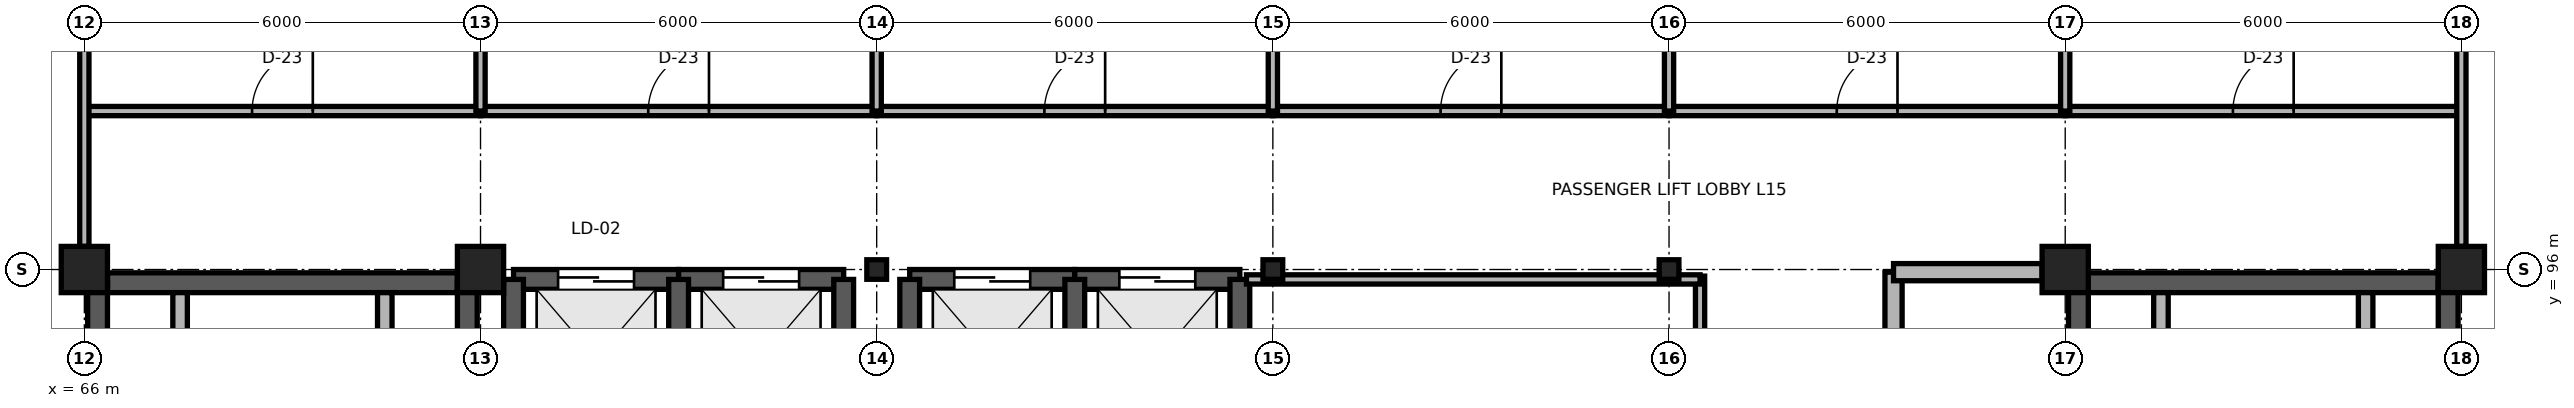
"""IFC4 building model, lengths in metres.
Left out: names, types, materials, properties, quantities, classifications, styles, units other than length and angle.
Written with IfcOpenShell. Run it as: python <this file> out.ifc"""

import sys

from ifc_helpers import new_model, si_unit, direction, frame, frame_2d, origin, origin_2d, place, context, subcontext, project, spatial, rectangle, i_section, extrude, element, fill, save


model = new_model("IFC4")
c1 = context("Model", 3, precision=1e-05, world=origin(), true_north=direction((0.0, 1.0)))
c2 = subcontext(c1, "Body", "Model", "MODEL_VIEW")
j1 = project(units=[si_unit("LENGTHUNIT", "METRE"), si_unit("PLANEANGLEUNIT", "RADIAN")], contexts=[c1])
p1 = place(None, origin())
s1 = spatial("IfcSite", under=j1, at=p1, CompositionType="ELEMENT")
p2 = place(p1, origin())
s2 = spatial("IfcBuilding", under=s1, at=p2, CompositionType="ELEMENT")
p3 = place(p2, frame((0.0, 0.0, 60.0)))
s3 = spatial("IfcBuildingStorey", under=s2, at=p3, CompositionType="ELEMENT", Elevation=60.0)
for number, where, z_axis, x_axis in (
    (1, (66.0, 96.0, 0.0), (0.0, 0.0, 1.0), (1.0, 0.0, 0.0)),
    (2, (72.0, 96.0, 0.0), (0.0, 0.0, 1.0), (1.0, 0.0, 0.0)),
):
    element("IfcColumn", number, at=place(p3, frame(where, z_axis=z_axis, x_axis=x_axis)), inside=s3, PredefinedType="COLUMN", context=c2, shape_type="SweptSolid", body=[
        extrude(rectangle(XDim=0.7, YDim=0.7, at=origin_2d()), origin(), (0.0, 0.0, 1.0), 3.9),
    ])
for number, where, z_axis, x_axis in (
    (3, (78.0, 96.0, 0.0), (0.0, 0.0, 1.0), (1.0, 0.0, 0.0)),
    (4, (84.0, 96.0, 0.0), (0.0, 0.0, 1.0), (1.0, 0.0, 0.0)),
    (5, (90.0, 96.0, 0.0), (0.0, 0.0, 1.0), (1.0, 0.0, 0.0)),
):
    element("IfcColumn", number, at=place(p3, frame(where, z_axis=z_axis, x_axis=x_axis)), inside=s3, PredefinedType="COLUMN", context=c2, shape_type="SweptSolid", body=[
        extrude(i_section(OverallWidth=0.299, OverallDepth=0.296, WebThickness=0.009, FlangeThickness=0.014, FilletRadius=0.018, at=origin_2d()), origin(), (0.0, 0.0, 1.0), 3.9),
    ])
for number, where, z_axis, x_axis in (
    (6, (96.0, 96.0, 0.0), (0.0, 0.0, 1.0), (1.0, 0.0, 0.0)),
    (7, (102.0, 96.0, 0.0), (0.0, 0.0, 1.0), (1.0, 0.0, 0.0)),
):
    element("IfcColumn", number, at=place(p3, frame(where, z_axis=z_axis, x_axis=x_axis)), inside=s3, PredefinedType="COLUMN", context=c2, shape_type="SweptSolid", body=[
        extrude(rectangle(XDim=0.7, YDim=0.7, at=origin_2d()), origin(), (0.0, 0.0, 1.0), 3.9),
    ])
p4 = place(p3, frame((66.35, 95.8, 0.0), z_axis=(0.0, 0.0, 1.0), x_axis=(1.0, 0.0, 0.0)))
e8 = element("IfcWall", 8, at=p4, inside=s3, PredefinedType="SHEAR", context=c2, shape_type="SweptSolid", body=[
    extrude(rectangle(XDim=5.3, YDim=0.3, at=frame_2d((2.65, 0.0))), origin(), (0.0, 0.0, 1.0), 3.74),
])
for number, where, z_axis, x_axis in (
    (9, (66.2, 84.0, 0.0), (0.0, 0.0, 1.0), (0.0, 1.0, 0.0)),
    (10, (71.8, 84.0, 0.0), (0.0, 0.0, 1.0), (0.0, 1.0, 0.0)),
):
    element("IfcWall", number, at=place(p3, frame(where, z_axis=z_axis, x_axis=x_axis)), inside=s3, PredefinedType="SHEAR", context=c2, shape_type="SweptSolid", body=[
        extrude(rectangle(XDim=11.8, YDim=0.3, at=frame_2d((5.9, 0.0))), origin(), (0.0, 0.0, 1.0), 3.74),
    ])
for number, where, z_axis, x_axis in (
    (11, (67.45, 94.4, 0.0), (0.0, 0.0, 1.0), (0.0, 1.0, 0.0)),
    (12, (70.55, 94.4, 0.0), (0.0, 0.0, 1.0), (0.0, 1.0, 0.0)),
):
    element("IfcWall", number, at=place(p3, frame(where, z_axis=z_axis, x_axis=x_axis)), inside=s3, PredefinedType="PARTITIONING", context=c2, shape_type="SweptSolid", body=[
        extrude(rectangle(XDim=1.25, YDim=0.22, at=frame_2d((0.625, 0.0))), origin(), (0.0, 0.0, 1.0), 3.74),
    ])
p5 = place(p3, frame((96.35, 95.8, 0.0), z_axis=(0.0, 0.0, 1.0), x_axis=(1.0, 0.0, 0.0)))
e13 = element("IfcWall", 13, at=p5, inside=s3, PredefinedType="SHEAR", context=c2, shape_type="SweptSolid", body=[
    extrude(rectangle(XDim=5.3, YDim=0.3, at=frame_2d((2.65, 0.0))), origin(), (0.0, 0.0, 1.0), 3.74),
])
for number, where, z_axis, x_axis in (
    (14, (96.2, 84.0, 0.0), (0.0, 0.0, 1.0), (0.0, 1.0, 0.0)),
    (15, (101.8, 84.0, 0.0), (0.0, 0.0, 1.0), (0.0, 1.0, 0.0)),
):
    element("IfcWall", number, at=place(p3, frame(where, z_axis=z_axis, x_axis=x_axis)), inside=s3, PredefinedType="SHEAR", context=c2, shape_type="SweptSolid", body=[
        extrude(rectangle(XDim=11.8, YDim=0.3, at=frame_2d((5.9, 0.0))), origin(), (0.0, 0.0, 1.0), 3.74),
    ])
for number, where, z_axis, x_axis in (
    (16, (97.45, 94.4, 0.0), (0.0, 0.0, 1.0), (0.0, 1.0, 0.0)),
    (17, (100.55, 94.4, 0.0), (0.0, 0.0, 1.0), (0.0, 1.0, 0.0)),
):
    element("IfcWall", number, at=place(p3, frame(where, z_axis=z_axis, x_axis=x_axis)), inside=s3, PredefinedType="PARTITIONING", context=c2, shape_type="SweptSolid", body=[
        extrude(rectangle(XDim=1.25, YDim=0.22, at=frame_2d((0.625, 0.0))), origin(), (0.0, 0.0, 1.0), 3.74),
    ])
p6 = place(p3, frame((72.5, 95.85, 0.0), z_axis=(0.0, 0.0, 1.0), x_axis=(1.0, 0.0, 0.0)))
e18 = element("IfcWall", 18, at=p6, inside=s3, PredefinedType="SHEAR", context=c2, shape_type="SweptSolid", body=[
    extrude(rectangle(XDim=2.5, YDim=0.3, at=frame_2d((1.25, 0.0))), origin(), (0.0, 0.0, 1.0), 3.74),
])
p7 = place(p6, frame((0.675, 0.0, 0.0)))
e19 = element("IfcOpeningElement", 19, at=p7, cuts=e18, PredefinedType="OPENING", context=c2, shape_type="SweptSolid", body=[
    extrude(rectangle(XDim=1.15, YDim=2.15, at=frame_2d((0.575, 1.075))), frame((0.0, 0.165, 0.0), z_axis=(0.0, -1.0, 0.0), x_axis=(1.0, 0.0, 0.0)), (0.0, 0.0, 1.0), 0.33),
])
p8 = place(p3, frame((72.5, 92.45, 0.0), z_axis=(0.0, 0.0, 1.0), x_axis=(0.0, 1.0, 0.0)))
e20 = element("IfcWall", 20, at=p8, inside=s3, PredefinedType="SHEAR", context=c2, shape_type="SweptSolid", body=[
    extrude(rectangle(XDim=3.4, YDim=0.3, at=frame_2d((1.7, 0.0))), origin(), (0.0, 0.0, 1.0), 3.74),
])
p9 = place(p3, frame((75.0, 95.85, 0.0), z_axis=(0.0, 0.0, 1.0), x_axis=(1.0, 0.0, 0.0)))
e21 = element("IfcWall", 21, at=p9, inside=s3, PredefinedType="SHEAR", context=c2, shape_type="SweptSolid", body=[
    extrude(rectangle(XDim=2.5, YDim=0.3, at=frame_2d((1.25, 0.0))), origin(), (0.0, 0.0, 1.0), 3.74),
])
p10 = place(p9, frame((0.675, 0.0, 0.0)))
e22 = element("IfcOpeningElement", 22, at=p10, cuts=e21, PredefinedType="OPENING", context=c2, shape_type="SweptSolid", body=[
    extrude(rectangle(XDim=1.15, YDim=2.15, at=frame_2d((0.575, 1.075))), frame((0.0, 0.165, 0.0), z_axis=(0.0, -1.0, 0.0), x_axis=(1.0, 0.0, 0.0)), (0.0, 0.0, 1.0), 0.33),
])
for number, where, z_axis, x_axis in (
    (23, (75.0, 92.45, 0.0), (0.0, 0.0, 1.0), (0.0, 1.0, 0.0)),
    (24, (77.5, 92.45, 0.0), (0.0, 0.0, 1.0), (0.0, 1.0, 0.0)),
):
    element("IfcWall", number, at=place(p3, frame(where, z_axis=z_axis, x_axis=x_axis)), inside=s3, PredefinedType="SHEAR", context=c2, shape_type="SweptSolid", body=[
        extrude(rectangle(XDim=3.4, YDim=0.3, at=frame_2d((1.7, 0.0))), origin(), (0.0, 0.0, 1.0), 3.74),
    ])
p11 = place(p3, frame((78.5, 95.85, 0.0), z_axis=(0.0, 0.0, 1.0), x_axis=(1.0, 0.0, 0.0)))
e25 = element("IfcWall", 25, at=p11, inside=s3, PredefinedType="SHEAR", context=c2, shape_type="SweptSolid", body=[
    extrude(rectangle(XDim=2.5, YDim=0.3, at=frame_2d((1.25, 0.0))), origin(), (0.0, 0.0, 1.0), 3.74),
])
p12 = place(p11, frame((0.675, 0.0, 0.0)))
e26 = element("IfcOpeningElement", 26, at=p12, cuts=e25, PredefinedType="OPENING", context=c2, shape_type="SweptSolid", body=[
    extrude(rectangle(XDim=1.15, YDim=2.15, at=frame_2d((0.575, 1.075))), frame((0.0, 0.165, 0.0), z_axis=(0.0, -1.0, 0.0), x_axis=(1.0, 0.0, 0.0)), (0.0, 0.0, 1.0), 0.33),
])
p13 = place(p3, frame((78.5, 92.45, 0.0), z_axis=(0.0, 0.0, 1.0), x_axis=(0.0, 1.0, 0.0)))
e27 = element("IfcWall", 27, at=p13, inside=s3, PredefinedType="SHEAR", context=c2, shape_type="SweptSolid", body=[
    extrude(rectangle(XDim=3.4, YDim=0.3, at=frame_2d((1.7, 0.0))), origin(), (0.0, 0.0, 1.0), 3.74),
])
p14 = place(p3, frame((81.0, 95.85, 0.0), z_axis=(0.0, 0.0, 1.0), x_axis=(1.0, 0.0, 0.0)))
e28 = element("IfcWall", 28, at=p14, inside=s3, PredefinedType="SHEAR", context=c2, shape_type="SweptSolid", body=[
    extrude(rectangle(XDim=2.5, YDim=0.3, at=frame_2d((1.25, 0.0))), origin(), (0.0, 0.0, 1.0), 3.74),
])
p15 = place(p14, frame((0.675, 0.0, 0.0)))
e29 = element("IfcOpeningElement", 29, at=p15, cuts=e28, PredefinedType="OPENING", context=c2, shape_type="SweptSolid", body=[
    extrude(rectangle(XDim=1.15, YDim=2.15, at=frame_2d((0.575, 1.075))), frame((0.0, 0.165, 0.0), z_axis=(0.0, -1.0, 0.0), x_axis=(1.0, 0.0, 0.0)), (0.0, 0.0, 1.0), 0.33),
])
for number, where, z_axis, x_axis in (
    (30, (81.0, 92.45, 0.0), (0.0, 0.0, 1.0), (0.0, 1.0, 0.0)),
    (31, (83.5, 92.45, 0.0), (0.0, 0.0, 1.0), (0.0, 1.0, 0.0)),
):
    element("IfcWall", number, at=place(p3, frame(where, z_axis=z_axis, x_axis=x_axis)), inside=s3, PredefinedType="SHEAR", context=c2, shape_type="SweptSolid", body=[
        extrude(rectangle(XDim=3.4, YDim=0.3, at=frame_2d((1.7, 0.0))), origin(), (0.0, 0.0, 1.0), 3.74),
    ])
p16 = place(p3, frame((93.4, 84.0, 0.0), z_axis=(0.0, 0.0, 1.0), x_axis=(0.0, 1.0, 0.0)))
e32 = element("IfcWall", 32, at=p16, inside=s3, PredefinedType="PARTITIONING", context=c2, shape_type="SweptSolid", body=[
    extrude(rectangle(XDim=11.96, YDim=0.26, at=frame_2d((5.98, 0.0))), origin(), (0.0, 0.0, 1.0), 3.74),
])
p17 = place(p16, frame((3.425, 0.0, 0.0)))
e33 = element("IfcOpeningElement", 33, at=p17, cuts=e32, PredefinedType="OPENING", context=c2, shape_type="SweptSolid", body=[
    extrude(rectangle(XDim=1.15, YDim=2.2, at=frame_2d((0.575, 1.1))), frame((0.0, 0.145, 0.0), z_axis=(0.0, -1.0, 0.0), x_axis=(1.0, 0.0, 0.0)), (0.0, 0.0, 1.0), 0.29),
])
p18 = place(p3, frame((93.4, 95.96, 0.0), z_axis=(0.0, 0.0, 1.0), x_axis=(1.0, 0.0, 0.0)))
e34 = element("IfcWall", 34, at=p18, inside=s3, PredefinedType="PARTITIONING", context=c2, shape_type="SweptSolid", body=[
    extrude(rectangle(XDim=2.25, YDim=0.26, at=frame_2d((1.125, 0.0))), origin(), (0.0, 0.0, 1.0), 3.449),
])
p19 = place(p3, frame((90.47, 92.5, 0.0), z_axis=(0.0, 0.0, 1.0), x_axis=(0.0, 1.0, 0.0)))
e35 = element("IfcWall", 35, at=p19, inside=s3, PredefinedType="PARTITIONING", context=c2, shape_type="SweptSolid", body=[
    extrude(rectangle(XDim=3.4, YDim=0.14, at=frame_2d((1.7, 0.0))), origin(), (0.0, 0.0, 1.0), 3.74),
])
p20 = place(p19, frame((1.24, 0.0, 0.0)))
e36 = element("IfcOpeningElement", 36, at=p20, cuts=e35, PredefinedType="OPENING", context=c2, shape_type="SweptSolid", body=[
    extrude(rectangle(XDim=0.92, YDim=2.15, at=frame_2d((0.46, 1.075))), frame((0.0, 0.085, 0.0), z_axis=(0.0, -1.0, 0.0), x_axis=(1.0, 0.0, 0.0)), (0.0, 0.0, 1.0), 0.17),
])
p21 = place(p3, frame((66.0, 98.4, 0.0), z_axis=(0.0, 0.0, 1.0), x_axis=(1.0, 0.0, 0.0)))
e37 = element("IfcWall", 37, at=p21, inside=s3, PredefinedType="PARTITIONING", context=c2, shape_type="SweptSolid", body=[
    extrude(rectangle(XDim=6.0, YDim=0.14, at=frame_2d((3.0, 0.0))), origin(), (0.0, 0.0, 1.0), 3.74),
])
p22 = place(p21, frame((2.54, 0.0, 0.0)))
e38 = element("IfcOpeningElement", 38, at=p22, cuts=e37, PredefinedType="OPENING", context=c2, shape_type="SweptSolid", body=[
    extrude(rectangle(XDim=0.92, YDim=2.15, at=frame_2d((0.46, 1.075))), frame((0.0, 0.085, 0.0), z_axis=(0.0, -1.0, 0.0), x_axis=(1.0, 0.0, 0.0)), (0.0, 0.0, 1.0), 0.17),
])
p23 = place(p3, frame((72.0, 98.4, 0.0), z_axis=(0.0, 0.0, 1.0), x_axis=(1.0, 0.0, 0.0)))
e39 = element("IfcWall", 39, at=p23, inside=s3, PredefinedType="PARTITIONING", context=c2, shape_type="SweptSolid", body=[
    extrude(rectangle(XDim=6.0, YDim=0.14, at=frame_2d((3.0, 0.0))), origin(), (0.0, 0.0, 1.0), 3.74),
])
p24 = place(p23, frame((2.54, 0.0, 0.0)))
e40 = element("IfcOpeningElement", 40, at=p24, cuts=e39, PredefinedType="OPENING", context=c2, shape_type="SweptSolid", body=[
    extrude(rectangle(XDim=0.92, YDim=2.15, at=frame_2d((0.46, 1.075))), frame((0.0, 0.085, 0.0), z_axis=(0.0, -1.0, 0.0), x_axis=(1.0, 0.0, 0.0)), (0.0, 0.0, 1.0), 0.17),
])
p25 = place(p3, frame((78.0, 98.4, 0.0), z_axis=(0.0, 0.0, 1.0), x_axis=(1.0, 0.0, 0.0)))
e41 = element("IfcWall", 41, at=p25, inside=s3, PredefinedType="PARTITIONING", context=c2, shape_type="SweptSolid", body=[
    extrude(rectangle(XDim=6.0, YDim=0.14, at=frame_2d((3.0, 0.0))), origin(), (0.0, 0.0, 1.0), 3.74),
])
p26 = place(p25, frame((2.54, 0.0, 0.0)))
e42 = element("IfcOpeningElement", 42, at=p26, cuts=e41, PredefinedType="OPENING", context=c2, shape_type="SweptSolid", body=[
    extrude(rectangle(XDim=0.92, YDim=2.15, at=frame_2d((0.46, 1.075))), frame((0.0, 0.085, 0.0), z_axis=(0.0, -1.0, 0.0), x_axis=(1.0, 0.0, 0.0)), (0.0, 0.0, 1.0), 0.17),
])
p27 = place(p3, frame((84.0, 98.4, 0.0), z_axis=(0.0, 0.0, 1.0), x_axis=(1.0, 0.0, 0.0)))
e43 = element("IfcWall", 43, at=p27, inside=s3, PredefinedType="PARTITIONING", context=c2, shape_type="SweptSolid", body=[
    extrude(rectangle(XDim=6.0, YDim=0.14, at=frame_2d((3.0, 0.0))), origin(), (0.0, 0.0, 1.0), 3.74),
])
p28 = place(p27, frame((2.54, 0.0, 0.0)))
e44 = element("IfcOpeningElement", 44, at=p28, cuts=e43, PredefinedType="OPENING", context=c2, shape_type="SweptSolid", body=[
    extrude(rectangle(XDim=0.92, YDim=2.15, at=frame_2d((0.46, 1.075))), frame((0.0, 0.085, 0.0), z_axis=(0.0, -1.0, 0.0), x_axis=(1.0, 0.0, 0.0)), (0.0, 0.0, 1.0), 0.17),
])
p29 = place(p3, frame((90.0, 98.4, 0.0), z_axis=(0.0, 0.0, 1.0), x_axis=(1.0, 0.0, 0.0)))
e45 = element("IfcWall", 45, at=p29, inside=s3, PredefinedType="PARTITIONING", context=c2, shape_type="SweptSolid", body=[
    extrude(rectangle(XDim=6.0, YDim=0.14, at=frame_2d((3.0, 0.0))), origin(), (0.0, 0.0, 1.0), 3.74),
])
p30 = place(p29, frame((2.54, 0.0, 0.0)))
e46 = element("IfcOpeningElement", 46, at=p30, cuts=e45, PredefinedType="OPENING", context=c2, shape_type="SweptSolid", body=[
    extrude(rectangle(XDim=0.92, YDim=2.15, at=frame_2d((0.46, 1.075))), frame((0.0, 0.085, 0.0), z_axis=(0.0, -1.0, 0.0), x_axis=(1.0, 0.0, 0.0)), (0.0, 0.0, 1.0), 0.17),
])
p31 = place(p3, frame((96.0, 98.4, 0.0), z_axis=(0.0, 0.0, 1.0), x_axis=(1.0, 0.0, 0.0)))
e47 = element("IfcWall", 47, at=p31, inside=s3, PredefinedType="PARTITIONING", context=c2, shape_type="SweptSolid", body=[
    extrude(rectangle(XDim=6.0, YDim=0.14, at=frame_2d((3.0, 0.0))), origin(), (0.0, 0.0, 1.0), 3.74),
])
p32 = place(p31, frame((2.54, 0.0, 0.0)))
e48 = element("IfcOpeningElement", 48, at=p32, cuts=e47, PredefinedType="OPENING", context=c2, shape_type="SweptSolid", body=[
    extrude(rectangle(XDim=0.92, YDim=2.15, at=frame_2d((0.46, 1.075))), frame((0.0, 0.085, 0.0), z_axis=(0.0, -1.0, 0.0), x_axis=(1.0, 0.0, 0.0)), (0.0, 0.0, 1.0), 0.17),
])
p33 = place(p3, frame((83.6, 95.85, 0.0), z_axis=(0.0, 0.0, 1.0), x_axis=(1.0, 0.0, 0.0)))
e49 = element("IfcWall", 49, at=p33, inside=s3, PredefinedType="PARTITIONING", context=c2, shape_type="SweptSolid", body=[
    extrude(rectangle(XDim=6.87, YDim=0.14, at=frame_2d((3.435, 0.0))), origin(), (0.0, 0.0, 1.0), 3.74),
])
for number, where, z_axis, x_axis in (
    (50, (72.0, 98.4, 0.0), (0.0, 0.0, 1.0), (0.0, 1.0, 0.0)),
    (51, (78.0, 98.4, 0.0), (0.0, 0.0, 1.0), (0.0, 1.0, 0.0)),
    (52, (84.0, 98.4, 0.0), (0.0, 0.0, 1.0), (0.0, 1.0, 0.0)),
    (53, (90.0, 98.4, 0.0), (0.0, 0.0, 1.0), (0.0, 1.0, 0.0)),
    (54, (96.0, 98.4, 0.0), (0.0, 0.0, 1.0), (0.0, 1.0, 0.0)),
):
    element("IfcWall", number, at=place(p3, frame(where, z_axis=z_axis, x_axis=x_axis)), inside=s3, PredefinedType="PARTITIONING", context=c2, shape_type="SweptSolid", body=[
        extrude(rectangle(XDim=3.15, YDim=0.14, at=frame_2d((1.575, 0.0))), origin(), (0.0, 0.0, 1.0), 3.449),
    ])
for number, where, z_axis, x_axis in (
    (55, (66.0, 96.35, 0.0), (0.0, 0.0, 1.0), (0.0, 1.0, 0.0)),
    (56, (102.0, 96.35, 0.0), (0.0, 0.0, 1.0), (0.0, 1.0, 0.0)),
):
    element("IfcWall", number, at=place(p3, frame(where, z_axis=z_axis, x_axis=x_axis)), inside=s3, PredefinedType="PARTITIONING", context=c2, shape_type="SweptSolid", body=[
        extrude(rectangle(XDim=5.3, YDim=0.14, at=frame_2d((2.65, 0.0))), origin(), (0.0, 0.0, 1.0), 3.449),
    ])
p34 = place(p7, origin())
e57 = element("IfcDoor", 57, at=p34, inside=s3, OperationType="DOUBLE_DOOR_SLIDING", PredefinedType="DOOR", context=c2, shape_type="SweptSolid", body=[
    extrude(rectangle(XDim=1.15, YDim=2.15, at=frame_2d((0.575, 1.075))), frame((0.0, 0.025, 0.0), z_axis=(0.0, -1.0, 0.0), x_axis=(1.0, 0.0, 0.0)), (0.0, 0.0, 1.0), 0.05),
])
fill(e19, e57)
p35 = place(p10, origin())
e58 = element("IfcDoor", 58, at=p35, inside=s3, OperationType="DOUBLE_DOOR_SLIDING", PredefinedType="DOOR", context=c2, shape_type="SweptSolid", body=[
    extrude(rectangle(XDim=1.15, YDim=2.15, at=frame_2d((0.575, 1.075))), frame((0.0, 0.025, 0.0), z_axis=(0.0, -1.0, 0.0), x_axis=(1.0, 0.0, 0.0)), (0.0, 0.0, 1.0), 0.05),
])
fill(e22, e58)
p36 = place(p12, origin())
e59 = element("IfcDoor", 59, at=p36, inside=s3, OperationType="DOUBLE_DOOR_SLIDING", PredefinedType="DOOR", context=c2, shape_type="SweptSolid", body=[
    extrude(rectangle(XDim=1.15, YDim=2.15, at=frame_2d((0.575, 1.075))), frame((0.0, 0.025, 0.0), z_axis=(0.0, -1.0, 0.0), x_axis=(1.0, 0.0, 0.0)), (0.0, 0.0, 1.0), 0.05),
])
fill(e26, e59)
p37 = place(p15, origin())
e60 = element("IfcDoor", 60, at=p37, inside=s3, OperationType="DOUBLE_DOOR_SLIDING", PredefinedType="DOOR", context=c2, shape_type="SweptSolid", body=[
    extrude(rectangle(XDim=1.15, YDim=2.15, at=frame_2d((0.575, 1.075))), frame((0.0, 0.025, 0.0), z_axis=(0.0, -1.0, 0.0), x_axis=(1.0, 0.0, 0.0)), (0.0, 0.0, 1.0), 0.05),
])
fill(e29, e60)
p38 = place(p22, origin())
e61 = element("IfcDoor", 61, at=p38, inside=s3, OperationType="SINGLE_SWING_RIGHT", PredefinedType="DOOR", context=c2, shape_type="SweptSolid", body=[
    extrude(rectangle(XDim=0.92, YDim=2.15, at=frame_2d((0.46, 1.075))), frame((0.0, 0.025, 0.0), z_axis=(0.0, -1.0, 0.0), x_axis=(1.0, 0.0, 0.0)), (0.0, 0.0, 1.0), 0.05),
])
fill(e38, e61)
p39 = place(p24, origin())
e62 = element("IfcDoor", 62, at=p39, inside=s3, OperationType="SINGLE_SWING_RIGHT", PredefinedType="DOOR", context=c2, shape_type="SweptSolid", body=[
    extrude(rectangle(XDim=0.92, YDim=2.15, at=frame_2d((0.46, 1.075))), frame((0.0, 0.025, 0.0), z_axis=(0.0, -1.0, 0.0), x_axis=(1.0, 0.0, 0.0)), (0.0, 0.0, 1.0), 0.05),
])
fill(e40, e62)
p40 = place(p26, origin())
e63 = element("IfcDoor", 63, at=p40, inside=s3, OperationType="SINGLE_SWING_RIGHT", PredefinedType="DOOR", context=c2, shape_type="SweptSolid", body=[
    extrude(rectangle(XDim=0.92, YDim=2.15, at=frame_2d((0.46, 1.075))), frame((0.0, 0.025, 0.0), z_axis=(0.0, -1.0, 0.0), x_axis=(1.0, 0.0, 0.0)), (0.0, 0.0, 1.0), 0.05),
])
fill(e42, e63)
p41 = place(p28, origin())
e64 = element("IfcDoor", 64, at=p41, inside=s3, OperationType="SINGLE_SWING_RIGHT", PredefinedType="DOOR", context=c2, shape_type="SweptSolid", body=[
    extrude(rectangle(XDim=0.92, YDim=2.15, at=frame_2d((0.46, 1.075))), frame((0.0, 0.025, 0.0), z_axis=(0.0, -1.0, 0.0), x_axis=(1.0, 0.0, 0.0)), (0.0, 0.0, 1.0), 0.05),
])
fill(e44, e64)
p42 = place(p30, origin())
e65 = element("IfcDoor", 65, at=p42, inside=s3, OperationType="SINGLE_SWING_RIGHT", PredefinedType="DOOR", context=c2, shape_type="SweptSolid", body=[
    extrude(rectangle(XDim=0.92, YDim=2.15, at=frame_2d((0.46, 1.075))), frame((0.0, 0.025, 0.0), z_axis=(0.0, -1.0, 0.0), x_axis=(1.0, 0.0, 0.0)), (0.0, 0.0, 1.0), 0.05),
])
fill(e46, e65)
p43 = place(p32, origin())
e66 = element("IfcDoor", 66, at=p43, inside=s3, OperationType="SINGLE_SWING_RIGHT", PredefinedType="DOOR", context=c2, shape_type="SweptSolid", body=[
    extrude(rectangle(XDim=0.92, YDim=2.15, at=frame_2d((0.46, 1.075))), frame((0.0, 0.025, 0.0), z_axis=(0.0, -1.0, 0.0), x_axis=(1.0, 0.0, 0.0)), (0.0, 0.0, 1.0), 0.05),
])
fill(e48, e66)
save(model, sys.argv[1])
